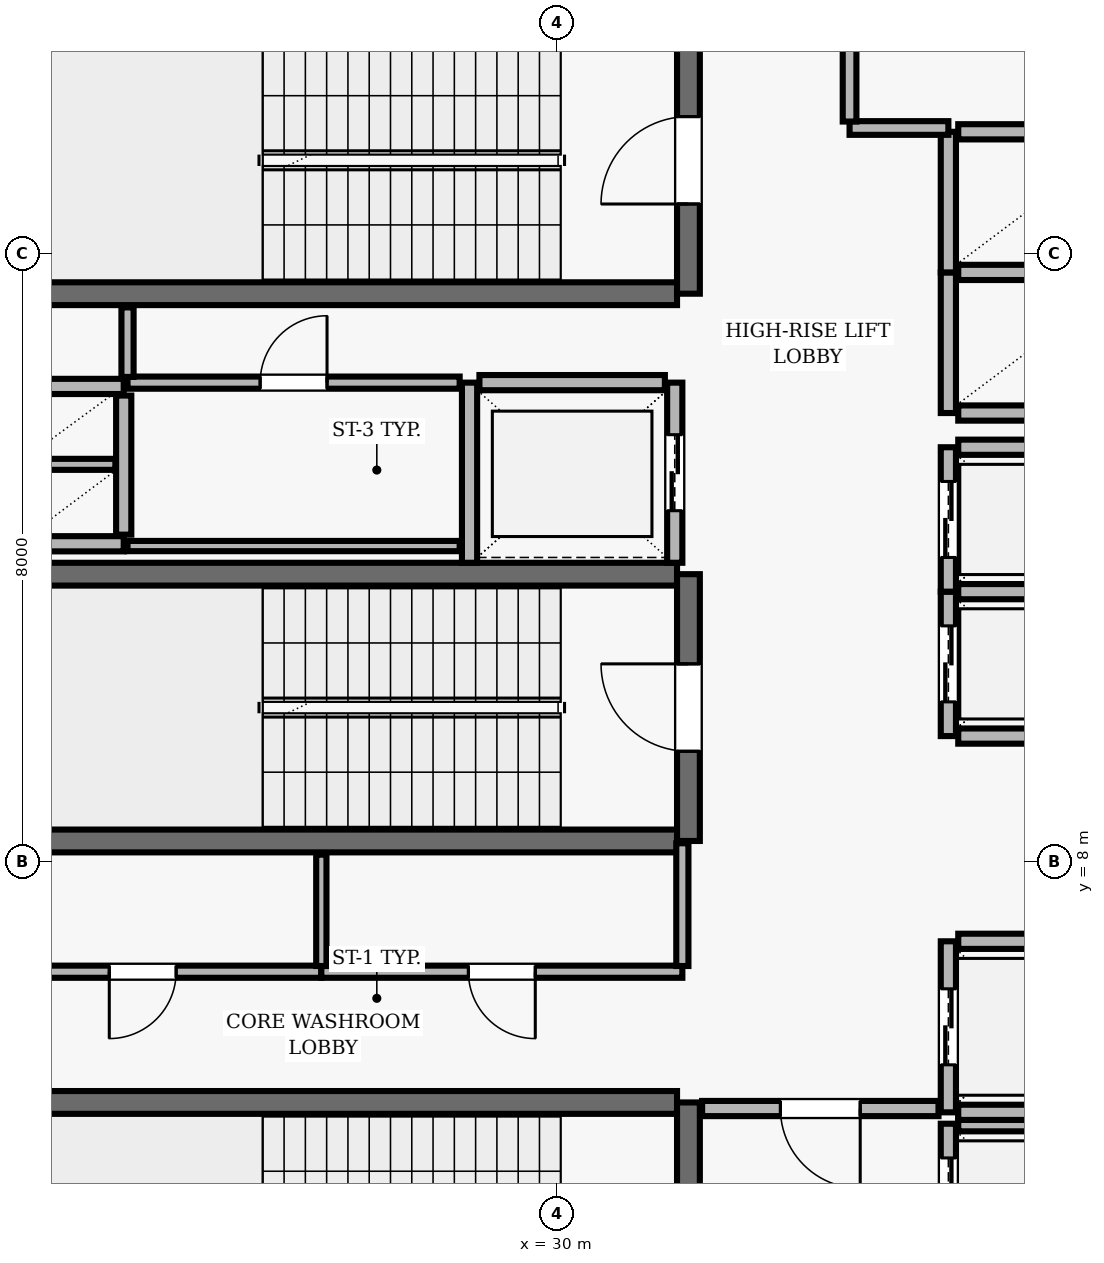
"""IFC4 building model, lengths in metres.
Left out: names, types, materials, properties, quantities, classifications, styles, units other than length and angle.
Written with IfcOpenShell. Run it as: python <this file> out.ifc"""

import sys

from ifc_helpers import new_model, si_unit, direction, frame, frame_2d, origin, place, context, subcontext, project, spatial, rectangle, extrude, element, fill, save


model = new_model("IFC4")
c1 = context("Model", 3, precision=1e-05, world=origin(), true_north=direction((0.0, 1.0)))
c2 = subcontext(c1, "Body", "Model", "MODEL_VIEW")
j1 = project(units=[si_unit("LENGTHUNIT", "METRE"), si_unit("PLANEANGLEUNIT", "RADIAN")], contexts=[c1])
p1 = place(None, origin())
s1 = spatial("IfcSite", under=j1, at=p1, CompositionType="ELEMENT")
p2 = place(p1, origin())
s2 = spatial("IfcBuilding", under=s1, at=p2, CompositionType="ELEMENT")
p3 = place(p2, frame((0.0, 0.0, 243.2)))
s3 = spatial("IfcBuildingStorey", under=s2, at=p3, CompositionType="ELEMENT", Elevation=243.2)
p4 = place(p3, frame((31.58, 4.83, 0.0), z_axis=(0.0, 0.0, 1.0), x_axis=(-1.0, 0.0, 0.0)))
e1 = element("IfcWall", 1, at=p4, inside=s3, PredefinedType="SHEAR", context=c2, shape_type="SweptSolid", body=[
    extrude(rectangle(XDim=8.36, YDim=0.3, at=frame_2d((4.18, 0.0))), origin(), (0.0, 0.0, 1.0), 4.79),
])
p5 = place(p3, frame((31.73, 0.96, 0.0), z_axis=(0.0, 0.0, 1.0), x_axis=(0.0, 1.0, 0.0)))
e2 = element("IfcWall", 2, at=p5, inside=s3, PredefinedType="SHEAR", context=c2, shape_type="SweptSolid", body=[
    extrude(rectangle(XDim=3.87, YDim=0.3, at=frame_2d((1.935, 0.0))), origin(), (0.0, 0.0, 1.0), 4.79),
])
p6 = place(p5, frame((1.54, 0.0, 0.0)))
e3 = element("IfcOpeningElement", 3, at=p6, cuts=e2, PredefinedType="OPENING", context=c2, shape_type="SweptSolid", body=[
    extrude(rectangle(XDim=1.15, YDim=2.15, at=frame_2d((0.575, 1.075))), frame((0.0, 0.16, 0.0), z_axis=(0.0, -1.0, 0.0), x_axis=(1.0, 0.0, 0.0)), (0.0, 0.0, 1.0), 0.32),
])
p7 = place(p3, frame((23.22, 15.47, 0.0), z_axis=(0.0, 0.0, 1.0), x_axis=(1.0, 0.0, 0.0)))
e4 = element("IfcWall", 4, at=p7, inside=s3, PredefinedType="SHEAR", context=c2, shape_type="SweptSolid", body=[
    extrude(rectangle(XDim=8.36, YDim=0.3, at=frame_2d((4.18, 0.0))), origin(), (0.0, 0.0, 1.0), 4.79),
])
p8 = place(p3, frame((31.73, 15.47, 0.0), z_axis=(0.0, 0.0, 1.0), x_axis=(0.0, 1.0, 0.0)))
e5 = element("IfcWall", 5, at=p8, inside=s3, PredefinedType="SHEAR", context=c2, shape_type="SweptSolid", body=[
    extrude(rectangle(XDim=3.51, YDim=0.3, at=frame_2d((1.755, 0.0))), origin(), (0.0, 0.0, 1.0), 4.79),
])
p9 = place(p8, frame((1.18, 0.0, 0.0)))
e6 = element("IfcOpeningElement", 6, at=p9, cuts=e5, PredefinedType="OPENING", context=c2, shape_type="SweptSolid", body=[
    extrude(rectangle(XDim=1.15, YDim=2.15, at=frame_2d((0.575, 1.075))), frame((0.0, 0.16, 0.0), z_axis=(0.0, -1.0, 0.0), x_axis=(1.0, 0.0, 0.0)), (0.0, 0.0, 1.0), 0.32),
])
for number, where, z_axis, x_axis in (
    (7, (31.58, 11.78, 0.0), (0.0, 0.0, 1.0), (-1.0, 0.0, 0.0)),
    (8, (23.22, 8.27, 0.0), (0.0, 0.0, 1.0), (1.0, 0.0, 0.0)),
):
    element("IfcWall", number, at=place(p3, frame(where, z_axis=z_axis, x_axis=x_axis)), inside=s3, PredefinedType="SHEAR", context=c2, shape_type="SweptSolid", body=[
        extrude(rectangle(XDim=8.36, YDim=0.3, at=frame_2d((4.18, 0.0))), origin(), (0.0, 0.0, 1.0), 4.79),
    ])
p10 = place(p3, frame((31.73, 8.27, 0.0), z_axis=(0.0, 0.0, 1.0), x_axis=(0.0, 1.0, 0.0)))
e9 = element("IfcWall", 9, at=p10, inside=s3, PredefinedType="SHEAR", context=c2, shape_type="SweptSolid", body=[
    extrude(rectangle(XDim=3.51, YDim=0.3, at=frame_2d((1.755, 0.0))), origin(), (0.0, 0.0, 1.0), 4.79),
])
p11 = place(p10, frame((1.18, 0.0, 0.0)))
e10 = element("IfcOpeningElement", 10, at=p11, cuts=e9, PredefinedType="OPENING", context=c2, shape_type="SweptSolid", body=[
    extrude(rectangle(XDim=1.15, YDim=2.15, at=frame_2d((0.575, 1.075))), frame((0.0, 0.16, 0.0), z_axis=(0.0, -1.0, 0.0), x_axis=(1.0, 0.0, 0.0)), (0.0, 0.0, 1.0), 0.32),
])
p12 = place(p3, frame((35.15, 4.55, 0.0), z_axis=(0.0, 0.0, 1.0), x_axis=(0.0, -1.0, 0.0)))
e11 = element("IfcWall", 11, at=p12, inside=s3, PredefinedType="SOLIDWALL", context=c2, shape_type="SweptSolid", body=[
    extrude(rectangle(XDim=2.1, YDim=0.2, at=frame_2d((1.05, 0.0))), origin(), (0.0, 0.0, 1.0), 4.79),
])
p13 = place(p12, frame((0.45, 0.0, 0.0)))
e12 = element("IfcOpeningElement", 12, at=p13, cuts=e11, PredefinedType="OPENING", context=c2, shape_type="SweptSolid", body=[
    extrude(rectangle(XDim=1.2, YDim=2.15, at=frame_2d((0.6, 1.075))), frame((0.0, 0.11, 0.0), z_axis=(0.0, -1.0, 0.0), x_axis=(1.0, 0.0, 0.0)), (0.0, 0.0, 1.0), 0.22),
])
p14 = place(p3, frame((37.42, 4.55, 0.0), z_axis=(0.0, 0.0, 1.0), x_axis=(-1.0, 0.0, 0.0)))
e13 = element("IfcWall", 13, at=p14, inside=s3, PredefinedType="SOLIDWALL", context=c2, shape_type="SweptSolid", body=[
    extrude(rectangle(XDim=2.14, YDim=0.2, at=frame_2d((1.07, 0.0))), origin(), (0.0, 0.0, 1.0), 4.79),
])
p15 = place(p3, frame((35.15, 6.95, 0.0), z_axis=(0.0, 0.0, 1.0), x_axis=(0.0, -1.0, 0.0)))
e14 = element("IfcWall", 14, at=p15, inside=s3, PredefinedType="SOLIDWALL", context=c2, shape_type="SweptSolid", body=[
    extrude(rectangle(XDim=2.25, YDim=0.2, at=frame_2d((1.125, 0.0))), origin(), (0.0, 0.0, 1.0), 4.79),
])
p16 = place(p15, frame((0.625, 0.0, 0.0)))
e15 = element("IfcOpeningElement", 15, at=p16, cuts=e14, PredefinedType="OPENING", context=c2, shape_type="SweptSolid", body=[
    extrude(rectangle(XDim=1.0, YDim=2.1, at=frame_2d((0.5, 1.05))), frame((0.0, 0.11, 0.0), z_axis=(0.0, -1.0, 0.0), x_axis=(1.0, 0.0, 0.0)), (0.0, 0.0, 1.0), 0.22),
])
for number, where, z_axis, x_axis in (
    (16, (35.28, 4.7, 0.0), (0.0, 0.0, 1.0), (1.0, 0.0, 0.0)),
    (17, (37.42, 6.95, 0.0), (0.0, 0.0, 1.0), (-1.0, 0.0, 0.0)),
):
    element("IfcWall", number, at=place(p3, frame(where, z_axis=z_axis, x_axis=x_axis)), inside=s3, PredefinedType="SOLIDWALL", context=c2, shape_type="SweptSolid", body=[
        extrude(rectangle(XDim=2.14, YDim=0.2, at=frame_2d((1.07, 0.0))), origin(), (0.0, 0.0, 1.0), 4.79),
    ])
p17 = place(p3, frame((35.15, 11.55, 0.0), z_axis=(0.0, 0.0, 1.0), x_axis=(0.0, -1.0, 0.0)))
e18 = element("IfcWall", 18, at=p17, inside=s3, PredefinedType="SOLIDWALL", context=c2, shape_type="SweptSolid", body=[
    extrude(rectangle(XDim=1.9, YDim=0.2, at=frame_2d((0.95, 0.0))), origin(), (0.0, 0.0, 1.0), 4.79),
])
p18 = place(p17, frame((0.45, 0.0, 0.0)))
e19 = element("IfcOpeningElement", 19, at=p18, cuts=e18, PredefinedType="OPENING", context=c2, shape_type="SweptSolid", body=[
    extrude(rectangle(XDim=1.0, YDim=2.1, at=frame_2d((0.5, 1.05))), frame((0.0, 0.11, 0.0), z_axis=(0.0, -1.0, 0.0), x_axis=(1.0, 0.0, 0.0)), (0.0, 0.0, 1.0), 0.22),
])
for number, where, z_axis, x_axis in (
    (20, (35.28, 9.65, 0.0), (0.0, 0.0, 1.0), (1.0, 0.0, 0.0)),
    (21, (37.42, 11.55, 0.0), (0.0, 0.0, 1.0), (-1.0, 0.0, 0.0)),
):
    element("IfcWall", number, at=place(p3, frame(where, z_axis=z_axis, x_axis=x_axis)), inside=s3, PredefinedType="SOLIDWALL", context=c2, shape_type="SweptSolid", body=[
        extrude(rectangle(XDim=2.14, YDim=0.2, at=frame_2d((1.07, 0.0))), origin(), (0.0, 0.0, 1.0), 4.79),
    ])
p19 = place(p3, frame((35.15, 13.45, 0.0), z_axis=(0.0, 0.0, 1.0), x_axis=(0.0, -1.0, 0.0)))
e22 = element("IfcWall", 22, at=p19, inside=s3, PredefinedType="SOLIDWALL", context=c2, shape_type="SweptSolid", body=[
    extrude(rectangle(XDim=1.9, YDim=0.2, at=frame_2d((0.95, 0.0))), origin(), (0.0, 0.0, 1.0), 4.79),
])
p20 = place(p19, frame((0.45, 0.0, 0.0)))
e23 = element("IfcOpeningElement", 23, at=p20, cuts=e22, PredefinedType="OPENING", context=c2, shape_type="SweptSolid", body=[
    extrude(rectangle(XDim=1.0, YDim=2.1, at=frame_2d((0.5, 1.05))), frame((0.0, 0.11, 0.0), z_axis=(0.0, -1.0, 0.0), x_axis=(1.0, 0.0, 0.0)), (0.0, 0.0, 1.0), 0.22),
])
p21 = place(p3, frame((37.42, 13.45, 0.0), z_axis=(0.0, 0.0, 1.0), x_axis=(-1.0, 0.0, 0.0)))
e24 = element("IfcWall", 24, at=p21, inside=s3, PredefinedType="SOLIDWALL", context=c2, shape_type="SweptSolid", body=[
    extrude(rectangle(XDim=2.14, YDim=0.2, at=frame_2d((1.07, 0.0))), origin(), (0.0, 0.0, 1.0), 4.79),
])
p22 = place(p3, frame((28.85, 14.3, 0.0), z_axis=(0.0, 0.0, 1.0), x_axis=(0.0, -1.0, 0.0)))
e25 = element("IfcWall", 25, at=p22, inside=s3, PredefinedType="SOLIDWALL", context=c2, shape_type="SweptSolid", body=[
    extrude(rectangle(XDim=2.37, YDim=0.2, at=frame_2d((1.185, 0.0))), origin(), (0.0, 0.0, 1.0), 4.79),
])
p23 = place(p3, frame((31.55, 11.93, 0.0), z_axis=(0.0, 0.0, 1.0), x_axis=(0.0, 1.0, 0.0)))
e26 = element("IfcWall", 26, at=p23, inside=s3, PredefinedType="SOLIDWALL", context=c2, shape_type="SweptSolid", body=[
    extrude(rectangle(XDim=2.37, YDim=0.2, at=frame_2d((1.185, 0.0))), origin(), (0.0, 0.0, 1.0), 4.79),
])
p24 = place(p23, frame((0.685, 0.0, 0.0)))
e27 = element("IfcOpeningElement", 27, at=p24, cuts=e26, PredefinedType="OPENING", context=c2, shape_type="SweptSolid", body=[
    extrude(rectangle(XDim=1.0, YDim=2.1, at=frame_2d((0.5, 1.05))), frame((0.0, 0.11, 0.0), z_axis=(0.0, -1.0, 0.0), x_axis=(1.0, 0.0, 0.0)), (0.0, 0.0, 1.0), 0.22),
])
p25 = place(p3, frame((31.42, 14.3, 0.0), z_axis=(0.0, 0.0, 1.0), x_axis=(-1.0, 0.0, 0.0)))
e28 = element("IfcWall", 28, at=p25, inside=s3, PredefinedType="SOLIDWALL", context=c2, shape_type="SweptSolid", body=[
    extrude(rectangle(XDim=2.44, YDim=0.2, at=frame_2d((1.22, 0.0))), origin(), (0.0, 0.0, 1.0), 4.79),
])
p26 = place(p3, frame((35.15, 15.75, 0.0), z_axis=(0.0, 0.0, 1.0), x_axis=(0.0, -1.0, 0.0)))
e29 = element("IfcWall", 29, at=p26, inside=s3, PredefinedType="SOLIDWALL", context=c2, shape_type="SweptSolid", body=[
    extrude(rectangle(XDim=1.85, YDim=0.2, at=frame_2d((0.925, 0.0))), origin(), (0.0, 0.0, 1.0), 4.79),
])
for number, where, z_axis, x_axis in (
    (30, (35.28, 13.9, 0.0), (0.0, 0.0, 1.0), (1.0, 0.0, 0.0)),
    (31, (37.42, 15.75, 0.0), (0.0, 0.0, 1.0), (-1.0, 0.0, 0.0)),
):
    element("IfcWall", number, at=place(p3, frame(where, z_axis=z_axis, x_axis=x_axis)), inside=s3, PredefinedType="SOLIDWALL", context=c2, shape_type="SweptSolid", body=[
        extrude(rectangle(XDim=2.14, YDim=0.2, at=frame_2d((1.07, 0.0))), origin(), (0.0, 0.0, 1.0), 4.79),
    ])
p27 = place(p3, frame((35.15, 17.6, 0.0), z_axis=(0.0, 0.0, 1.0), x_axis=(0.0, -1.0, 0.0)))
e32 = element("IfcWall", 32, at=p27, inside=s3, PredefinedType="SOLIDWALL", context=c2, shape_type="SweptSolid", body=[
    extrude(rectangle(XDim=1.85, YDim=0.2, at=frame_2d((0.925, 0.0))), origin(), (0.0, 0.0, 1.0), 4.79),
])
p28 = place(p3, frame((37.42, 17.6, 0.0), z_axis=(0.0, 0.0, 1.0), x_axis=(-1.0, 0.0, 0.0)))
e33 = element("IfcWall", 33, at=p28, inside=s3, PredefinedType="SOLIDWALL", context=c2, shape_type="SweptSolid", body=[
    extrude(rectangle(XDim=2.14, YDim=0.2, at=frame_2d((1.07, 0.0))), origin(), (0.0, 0.0, 1.0), 4.79),
])
for number, where, z_axis, x_axis in (
    (34, (22.9, 14.25, 0.0), (0.0, 0.0, 1.0), (1.0, 0.0, 0.0)),
    (35, (22.9, 12.18, 0.0), (0.0, 0.0, 1.0), (1.0, 0.0, 0.0)),
):
    element("IfcWall", number, at=place(p3, frame(where, z_axis=z_axis, x_axis=x_axis)), inside=s3, PredefinedType="SOLIDWALL", context=c2, shape_type="SweptSolid", body=[
        extrude(rectangle(XDim=1.4, YDim=0.2, at=frame_2d((0.7, 0.0))), origin(), (0.0, 0.0, 1.0), 4.79),
    ])
p29 = place(p3, frame((24.3, 12.3, 0.0), z_axis=(0.0, 0.0, 1.0), x_axis=(0.0, 1.0, 0.0)))
e36 = element("IfcWall", 36, at=p29, inside=s3, PredefinedType="SOLIDWALL", context=c2, shape_type="SweptSolid", body=[
    extrude(rectangle(XDim=1.83, YDim=0.2, at=frame_2d((0.915, 0.0))), origin(), (0.0, 0.0, 1.0), 4.79),
])
p30 = place(p3, frame((23.01, 13.225, 0.0), z_axis=(0.0, 0.0, 1.0), x_axis=(1.0, 0.0, 0.0)))
e37 = element("IfcWall", 37, at=p30, inside=s3, PredefinedType="PARTITIONING", context=c2, shape_type="SweptSolid", body=[
    extrude(rectangle(XDim=1.18, YDim=0.145, at=frame_2d((0.59, 0.0))), origin(), (0.0, 0.0, 1.0), 4.79),
])
p31 = place(p3, frame((24.35, 12.15, 0.0), z_axis=(0.0, 0.0, 1.0), x_axis=(1.0, 0.0, 0.0)))
e38 = element("IfcWall", 38, at=p31, inside=s3, PredefinedType="PARTITIONING", context=c2, shape_type="SweptSolid", body=[
    extrude(rectangle(XDim=4.37, YDim=0.135, at=frame_2d((2.185, 0.0))), origin(), (0.0, 0.0, 1.0), 4.79),
])
p32 = place(p3, frame((24.35, 14.3, 0.0), z_axis=(0.0, 0.0, 1.0), x_axis=(1.0, 0.0, 0.0)))
e39 = element("IfcWall", 39, at=p32, inside=s3, PredefinedType="PARTITIONING", context=c2, shape_type="SweptSolid", body=[
    extrude(rectangle(XDim=4.37, YDim=0.16, at=frame_2d((2.185, 0.0))), origin(), (0.0, 0.0, 1.0), 4.79),
])
p33 = place(p32, frame((1.745, 0.0, 0.0)))
e40 = element("IfcOpeningElement", 40, at=p33, cuts=e39, PredefinedType="OPENING", context=c2, shape_type="SweptSolid", body=[
    extrude(rectangle(XDim=0.88, YDim=2.1, at=frame_2d((0.44, 1.05))), frame((0.0, 0.09, 0.0), z_axis=(0.0, -1.0, 0.0), x_axis=(1.0, 0.0, 0.0)), (0.0, 0.0, 1.0), 0.18),
])
p34 = place(p3, frame((26.9, 6.55, 0.0), z_axis=(0.0, 0.0, 1.0), x_axis=(-1.0, 0.0, 0.0)))
e41 = element("IfcWall", 41, at=p34, inside=s3, PredefinedType="PARTITIONING", context=c2, shape_type="SweptSolid", body=[
    extrude(rectangle(XDim=4.7, YDim=0.16, at=frame_2d((2.35, 0.0))), origin(), (0.0, 0.0, 1.0), 4.79),
])
p35 = place(p34, frame((1.91, 0.0, 0.0)))
e42 = element("IfcOpeningElement", 42, at=p35, cuts=e41, PredefinedType="OPENING", context=c2, shape_type="SweptSolid", body=[
    extrude(rectangle(XDim=0.88, YDim=2.1, at=frame_2d((0.44, 1.05))), frame((0.0, 0.09, 0.0), z_axis=(0.0, -1.0, 0.0), x_axis=(1.0, 0.0, 0.0)), (0.0, 0.0, 1.0), 0.18),
])
p36 = place(p3, frame((31.65, 6.55, 0.0), z_axis=(0.0, 0.0, 1.0), x_axis=(-1.0, 0.0, 0.0)))
e43 = element("IfcWall", 43, at=p36, inside=s3, PredefinedType="PARTITIONING", context=c2, shape_type="SweptSolid", body=[
    extrude(rectangle(XDim=4.75, YDim=0.16, at=frame_2d((2.375, 0.0))), origin(), (0.0, 0.0, 1.0), 4.79),
])
p37 = place(p36, frame((1.935, 0.0, 0.0)))
e44 = element("IfcOpeningElement", 44, at=p37, cuts=e43, PredefinedType="OPENING", context=c2, shape_type="SweptSolid", body=[
    extrude(rectangle(XDim=0.88, YDim=2.1, at=frame_2d((0.44, 1.05))), frame((0.0, 0.09, 0.0), z_axis=(0.0, -1.0, 0.0), x_axis=(1.0, 0.0, 0.0)), (0.0, 0.0, 1.0), 0.18),
])
p38 = place(p3, frame((33.85, 17.65, 0.0), z_axis=(0.0, 0.0, 1.0), x_axis=(1.0, 0.0, 0.0)))
e45 = element("IfcWall", 45, at=p38, inside=s3, PredefinedType="PARTITIONING", context=c2, shape_type="SweptSolid", body=[
    extrude(rectangle(XDim=1.3, YDim=0.18, at=frame_2d((0.65, 0.0))), origin(), (0.0, 0.0, 1.0), 4.79),
])
p39 = place(p3, frame((35.02, 4.75, 0.0), z_axis=(0.0, 0.0, 1.0), x_axis=(-1.0, 0.0, 0.0)))
e46 = element("IfcWall", 46, at=p39, inside=s3, PredefinedType="SOLIDWALL", context=c2, shape_type="SweptSolid", body=[
    extrude(rectangle(XDim=3.11, YDim=0.2, at=frame_2d((1.555, 0.0))), origin(), (0.0, 0.0, 1.0), 4.79),
])
p40 = place(p39, frame((1.03, 0.0, 0.0)))
e47 = element("IfcOpeningElement", 47, at=p40, cuts=e46, PredefinedType="OPENING", context=c2, shape_type="SweptSolid", body=[
    extrude(rectangle(XDim=1.05, YDim=2.15, at=frame_2d((0.525, 1.075))), frame((0.0, 0.11, 0.0), z_axis=(0.0, -1.0, 0.0), x_axis=(1.0, 0.0, 0.0)), (0.0, 0.0, 1.0), 0.22),
])
p41 = place(p3, frame((24.35, 15.29, 0.0), z_axis=(0.0, 0.0, 1.0), x_axis=(0.0, -1.0, 0.0)))
e48 = element("IfcWall", 48, at=p41, inside=s3, PredefinedType="PARTITIONING", context=c2, shape_type="SweptSolid", body=[
    extrude(rectangle(XDim=0.915, YDim=0.16, at=frame_2d((0.458, 0.0))), origin(), (0.0, 0.0, 1.0), 4.79),
])
p42 = place(p3, frame((26.9, 6.625, 0.0), z_axis=(0.0, 0.0, 1.0), x_axis=(0.0, 1.0, 0.0)))
e49 = element("IfcWall", 49, at=p42, inside=s3, PredefinedType="PARTITIONING", context=c2, shape_type="SweptSolid", body=[
    extrude(rectangle(XDim=1.465, YDim=0.135, at=frame_2d((0.732, 0.0))), origin(), (0.0, 0.0, 1.0), 4.79),
])
p43 = place(p3, frame((31.65, 8.24, 0.0), z_axis=(0.0, 0.0, 1.0), x_axis=(0.0, -1.0, 0.0)))
e50 = element("IfcWall", 50, at=p43, inside=s3, PredefinedType="PARTITIONING", context=c2, shape_type="SweptSolid", body=[
    extrude(rectangle(XDim=1.615, YDim=0.16, at=frame_2d((0.808, 0.0))), origin(), (0.0, 0.0, 1.0), 4.79),
])
p44 = place(p3, frame((33.85, 17.735, 0.0), z_axis=(0.0, 0.0, 1.0), x_axis=(0.0, 1.0, 0.0)))
e51 = element("IfcWall", 51, at=p44, inside=s3, PredefinedType="PARTITIONING", context=c2, shape_type="SweptSolid", body=[
    extrude(rectangle(XDim=2.93, YDim=0.18, at=frame_2d((1.465, 0.0))), origin(), (0.0, 0.0, 1.0), 4.79),
])
p45 = place(p44, frame((0.99, 0.0, 0.0)))
e52 = element("IfcOpeningElement", 52, at=p45, cuts=e51, PredefinedType="OPENING", context=c2, shape_type="SweptSolid", body=[
    extrude(rectangle(XDim=0.95, YDim=2.1, at=frame_2d((0.475, 1.05))), frame((0.0, 0.1, 0.0), z_axis=(0.0, -1.0, 0.0), x_axis=(1.0, 0.0, 0.0)), (0.0, 0.0, 1.0), 0.2),
])
p46 = place(p9, origin())
e53 = element("IfcDoor", 53, at=p46, inside=s3, OperationType="SINGLE_SWING_LEFT", PredefinedType="DOOR", context=c2, shape_type="SweptSolid", body=[
    extrude(rectangle(XDim=1.15, YDim=2.15, at=frame_2d((0.575, 1.075))), frame((0.0, 0.025, 0.0), z_axis=(0.0, -1.0, 0.0), x_axis=(1.0, 0.0, 0.0)), (0.0, 0.0, 1.0), 0.05),
])
fill(e6, e53)
p47 = place(p11, origin())
e54 = element("IfcDoor", 54, at=p47, inside=s3, OperationType="SINGLE_SWING_RIGHT", PredefinedType="DOOR", context=c2, shape_type="SweptSolid", body=[
    extrude(rectangle(XDim=1.15, YDim=2.15, at=frame_2d((0.575, 1.075))), frame((0.0, 0.025, 0.0), z_axis=(0.0, -1.0, 0.0), x_axis=(1.0, 0.0, 0.0)), (0.0, 0.0, 1.0), 0.05),
])
fill(e10, e54)
p48 = place(p13, origin())
e55 = element("IfcDoor", 55, at=p48, inside=s3, OperationType="DOUBLE_DOOR_SLIDING", PredefinedType="DOOR", context=c2, shape_type="SweptSolid", body=[
    extrude(rectangle(XDim=1.2, YDim=2.15, at=frame_2d((0.6, 1.075))), frame((0.0, 0.025, 0.0), z_axis=(0.0, -1.0, 0.0), x_axis=(1.0, 0.0, 0.0)), (0.0, 0.0, 1.0), 0.05),
])
fill(e12, e55)
p49 = place(p16, origin())
e56 = element("IfcDoor", 56, at=p49, inside=s3, OperationType="DOUBLE_DOOR_SLIDING", PredefinedType="DOOR", context=c2, shape_type="SweptSolid", body=[
    extrude(rectangle(XDim=1.0, YDim=2.1, at=frame_2d((0.5, 1.05))), frame((0.0, 0.025, 0.0), z_axis=(0.0, -1.0, 0.0), x_axis=(1.0, 0.0, 0.0)), (0.0, 0.0, 1.0), 0.05),
])
fill(e15, e56)
p50 = place(p18, origin())
e57 = element("IfcDoor", 57, at=p50, inside=s3, OperationType="DOUBLE_DOOR_SLIDING", PredefinedType="DOOR", context=c2, shape_type="SweptSolid", body=[
    extrude(rectangle(XDim=1.0, YDim=2.1, at=frame_2d((0.5, 1.05))), frame((0.0, 0.025, 0.0), z_axis=(0.0, -1.0, 0.0), x_axis=(1.0, 0.0, 0.0)), (0.0, 0.0, 1.0), 0.05),
])
fill(e19, e57)
p51 = place(p20, origin())
e58 = element("IfcDoor", 58, at=p51, inside=s3, OperationType="DOUBLE_DOOR_SLIDING", PredefinedType="DOOR", context=c2, shape_type="SweptSolid", body=[
    extrude(rectangle(XDim=1.0, YDim=2.1, at=frame_2d((0.5, 1.05))), frame((0.0, 0.025, 0.0), z_axis=(0.0, -1.0, 0.0), x_axis=(1.0, 0.0, 0.0)), (0.0, 0.0, 1.0), 0.05),
])
fill(e23, e58)
p52 = place(p24, origin())
e59 = element("IfcDoor", 59, at=p52, inside=s3, OperationType="DOUBLE_DOOR_SLIDING", PredefinedType="DOOR", context=c2, shape_type="SweptSolid", body=[
    extrude(rectangle(XDim=1.0, YDim=2.1, at=frame_2d((0.5, 1.05))), frame((0.0, 0.025, 0.0), z_axis=(0.0, -1.0, 0.0), x_axis=(1.0, 0.0, 0.0)), (0.0, 0.0, 1.0), 0.05),
])
fill(e27, e59)
p53 = place(p40, origin())
e60 = element("IfcDoor", 60, at=p53, inside=s3, OperationType="SINGLE_SWING_LEFT", PredefinedType="DOOR", context=c2, shape_type="SweptSolid", body=[
    extrude(rectangle(XDim=1.05, YDim=2.15, at=frame_2d((0.525, 1.075))), frame((0.0, 0.025, 0.0), z_axis=(0.0, -1.0, 0.0), x_axis=(1.0, 0.0, 0.0)), (0.0, 0.0, 1.0), 0.05),
])
fill(e47, e60)
p54 = place(p35, origin())
e61 = element("IfcDoor", 61, at=p54, inside=s3, OperationType="SINGLE_SWING_RIGHT", PredefinedType="DOOR", context=c2, shape_type="SweptSolid", body=[
    extrude(rectangle(XDim=0.88, YDim=2.1, at=frame_2d((0.44, 1.05))), frame((0.0, 0.025, 0.0), z_axis=(0.0, -1.0, 0.0), x_axis=(1.0, 0.0, 0.0)), (0.0, 0.0, 1.0), 0.05),
])
fill(e42, e61)
p55 = place(p37, origin())
e62 = element("IfcDoor", 62, at=p55, inside=s3, OperationType="SINGLE_SWING_LEFT", PredefinedType="DOOR", context=c2, shape_type="SweptSolid", body=[
    extrude(rectangle(XDim=0.88, YDim=2.1, at=frame_2d((0.44, 1.05))), frame((0.0, 0.025, 0.0), z_axis=(0.0, -1.0, 0.0), x_axis=(1.0, 0.0, 0.0)), (0.0, 0.0, 1.0), 0.05),
])
fill(e44, e62)
p56 = place(p33, origin())
e63 = element("IfcDoor", 63, at=p56, inside=s3, OperationType="SINGLE_SWING_RIGHT", PredefinedType="DOOR", context=c2, shape_type="SweptSolid", body=[
    extrude(rectangle(XDim=0.88, YDim=2.1, at=frame_2d((0.44, 1.05))), frame((0.0, 0.025, 0.0), z_axis=(0.0, -1.0, 0.0), x_axis=(1.0, 0.0, 0.0)), (0.0, 0.0, 1.0), 0.05),
])
fill(e40, e63)
save(model, sys.argv[1])
